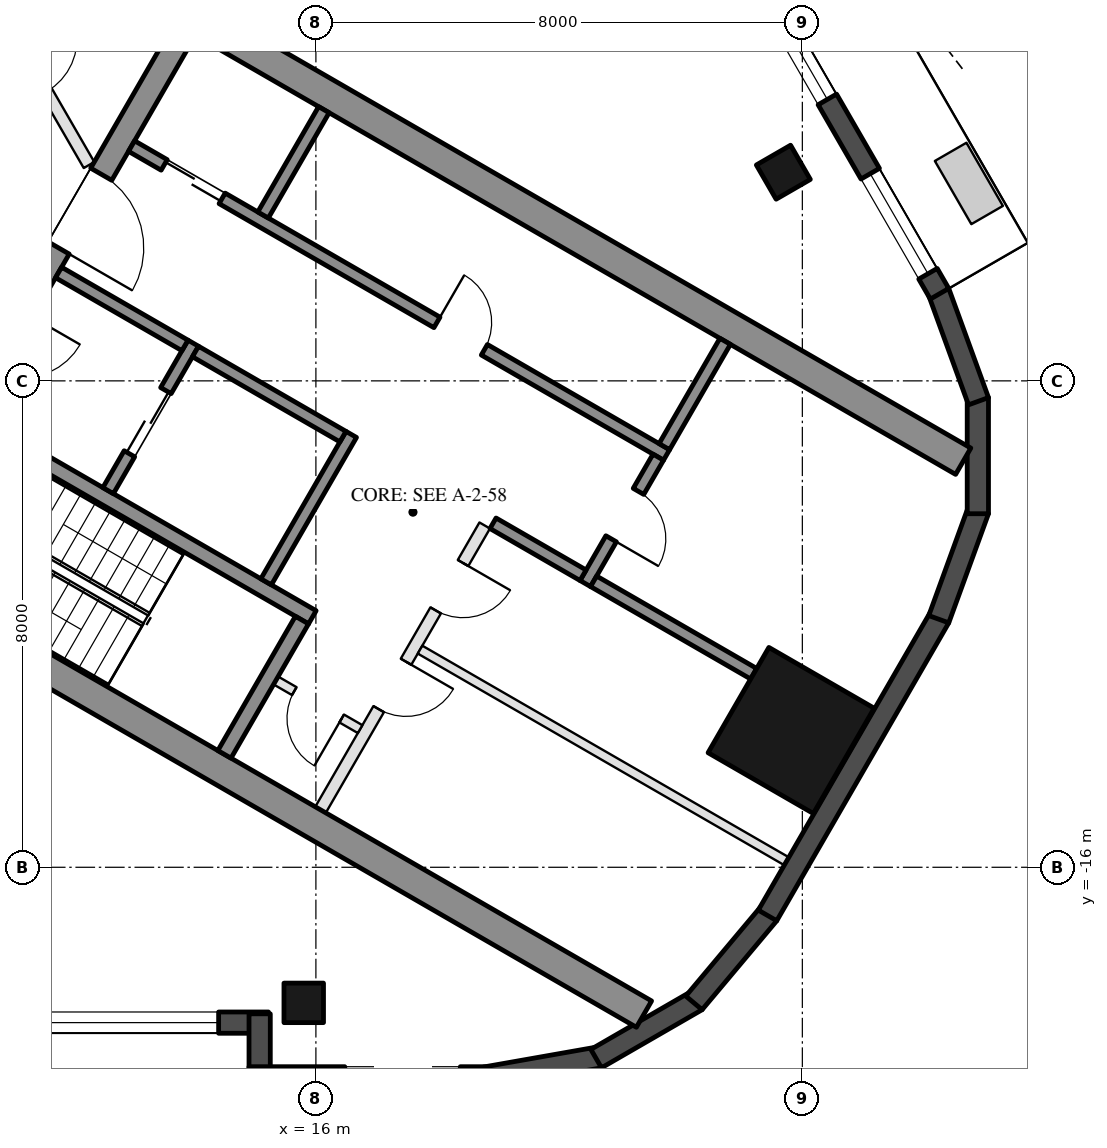
"""IFC4 building model, lengths in metres.
Left out: names, types, materials, properties, quantities, classifications, styles, units other than length and angle.
Written with IfcOpenShell. Run it as: python <this file> out.ifc"""

import sys

from ifc_helpers import new_model, si_unit, direction, frame, frame_2d, origin, origin_2d, place, context, subcontext, project, spatial, rectangle, hollow_rectangle, extrude, boolean, halfspace, element, fill, save


model = new_model("IFC4")
c1 = context("Model", 3, precision=1e-05, world=origin(), true_north=direction((0.0, 1.0)))
c2 = subcontext(c1, "Body", "Model", "MODEL_VIEW")
j1 = project(units=[si_unit("LENGTHUNIT", "METRE"), si_unit("PLANEANGLEUNIT", "RADIAN")], contexts=[c1])
p1 = place(None, origin())
s1 = spatial("IfcSite", under=j1, at=p1, CompositionType="ELEMENT")
p2 = place(p1, origin())
s2 = spatial("IfcBuilding", under=s1, at=p2, CompositionType="ELEMENT")
p3 = place(p2, frame((0.0, 0.0, 250.4)))
s3 = spatial("IfcBuildingStorey", under=s2, at=p3, CompositionType="ELEMENT", Elevation=250.4)
for number, where, z_axis, x_axis in (
    (1, (15.8, -18.23, 0.0), (0.0, 0.0, 1.0), (-1.0, 0.0, 0.0)),
    (2, (23.688, -4.568, 0.0), (0.0, 0.0, 1.0), (-0.5, 0.866, 0.0)),
):
    element("IfcColumn", number, at=place(p3, frame(where, z_axis=z_axis, x_axis=x_axis)), inside=s3, PredefinedType="COLUMN", context=c2, shape_type="SweptSolid", body=[
        boolean("DIFFERENCE", extrude(hollow_rectangle(XDim=0.65, YDim=0.65, WallThickness=0.03, at=origin_2d()), origin(), (0.0, 0.0, 1.0), 3.7), halfspace(frame((0.0, 0.0, 3.653), z_axis=(0.0, 0.0, 1.0), x_axis=(1.0, 0.0, 0.0)), False)),
    ])
p4 = place(p3, frame((23.816, -13.75, 0.0), z_axis=(0.0, 0.0, 1.0), x_axis=(0.5, 0.866025403784, 0.0)))
e3 = element("IfcColumn", 3, at=p4, inside=s3, PredefinedType="COLUMN", context=c2, shape_type="SweptSolid", body=[
    boolean("DIFFERENCE", extrude(hollow_rectangle(XDim=2.0, YDim=2.0, WallThickness=0.05, at=origin_2d()), origin(), (0.0, 0.0, 1.0), 3.7), halfspace(frame((0.0, 0.0, 3.588), z_axis=(0.0, 0.0, 1.0), x_axis=(1.0, 0.0, 0.0)), False)),
])
p5 = place(p3, frame((8.48, -18.555, 0.0), z_axis=(0.0, 0.0, 1.0), x_axis=(1.0, 0.0, 0.0)))
e4 = element("IfcWall", 4, at=p5, inside=s3, PredefinedType="SOLIDWALL", context=c2, shape_type="SweptSolid", body=[
    extrude(rectangle(XDim=6.74, YDim=0.35, at=frame_2d((3.37, 0.0))), origin(), (0.0, 0.0, 1.0), 3.55),
])
p6 = place(p5, frame((0.32, 0.0, 0.0)))
e5 = element("IfcOpeningElement", 5, at=p6, cuts=e4, PredefinedType="OPENING", context=c2, shape_type="SweptSolid", body=[
    extrude(rectangle(XDim=2.4, YDim=2.4, at=frame_2d((1.2, 1.2))), frame((0.0, 0.185, 0.0), z_axis=(0.0, -1.0, 0.0), x_axis=(1.0, 0.0, 0.0)), (0.0, 0.0, 1.0), 0.37),
])
p7 = place(p5, frame((3.02, 0.0, 0.3)))
e6 = element("IfcOpeningElement", 6, at=p7, cuts=e4, PredefinedType="OPENING", context=c2, shape_type="SweptSolid", body=[
    extrude(rectangle(XDim=2.9, YDim=2.65, at=frame_2d((1.45, 1.325))), frame((0.0, 0.185, 0.0), z_axis=(0.0, -1.0, 0.0), x_axis=(1.0, 0.0, 0.0)), (0.0, 0.0, 1.0), 0.37),
])
p8 = place(p3, frame((15.075, -18.41, 0.0), z_axis=(0.0, 0.0, 1.0), x_axis=(0.0, -1.0, 0.0)))
e7 = element("IfcWall", 7, at=p8, inside=s3, PredefinedType="SOLIDWALL", context=c2, shape_type="SweptSolid", body=[
    extrude(rectangle(XDim=1.22, YDim=0.35, at=frame_2d((0.61, 0.0))), origin(), (0.0, 0.0, 1.0), 3.55),
])
p9 = place(p3, frame((14.9, -19.455, 0.0), z_axis=(0.0, 0.0, 1.0), x_axis=(1.0, 0.0, 0.0)))
e8 = element("IfcWall", 8, at=p9, inside=s3, PredefinedType="SOLIDWALL", context=c2, shape_type="SweptSolid", body=[
    extrude(rectangle(XDim=3.916, YDim=0.35, at=frame_2d((1.958, 0.0))), origin(), (0.0, 0.0, 1.0), 3.55),
])
p10 = place(p9, frame((1.575, 0.0, 0.3)))
e9 = element("IfcOpeningElement", 9, at=p10, cuts=e8, PredefinedType="OPENING", context=c2, shape_type="SweptSolid", body=[
    extrude(rectangle(XDim=1.9, YDim=2.65, at=frame_2d((0.95, 1.325))), frame((0.0, 0.185, 0.0), z_axis=(0.0, -1.0, 0.0), x_axis=(1.0, 0.0, 0.0)), (0.0, 0.0, 1.0), 0.37),
])
p11 = place(p3, frame((18.785, -19.458, 0.0), z_axis=(0.0, 0.0, 1.0), x_axis=(0.984798995425, 0.173697837091, 0.0)))
e10 = element("IfcWall", 10, at=p11, inside=s3, PredefinedType="SOLIDWALL", context=c2, shape_type="SweptSolid", body=[
    extrude(rectangle(XDim=1.91, YDim=0.35, at=frame_2d((0.955, 0.0))), origin(), (0.0, 0.0, 1.0), 3.55),
])
for number, where, z_axis, x_axis in (
    (11, (20.61, -19.147, 0.0), (0.0, 0.0, 1.0), (0.866, 0.5, 0.0)),
    (12, (22.217, -18.231, 0.0), (0.0, 0.0, 1.0), (0.643, 0.766, 0.0)),
):
    element("IfcWall", number, at=place(p3, frame(where, z_axis=z_axis, x_axis=x_axis)), inside=s3, PredefinedType="SOLIDWALL", context=c2, shape_type="SweptSolid", body=[
        extrude(rectangle(XDim=1.91, YDim=0.35, at=frame_2d((0.955, 0.0))), origin(), (0.0, 0.0, 1.0), 3.55),
    ])
p12 = place(p3, frame((23.427, -16.792, 0.0), z_axis=(0.0, 0.0, 1.0), x_axis=(0.500018773155, 0.866014564827, 0.0)))
e13 = element("IfcWall", 13, at=p12, inside=s3, PredefinedType="SOLIDWALL", context=c2, shape_type="SweptSolid", body=[
    extrude(rectangle(XDim=5.658, YDim=0.35, at=frame_2d((2.829, 0.0))), origin(), (0.0, 0.0, 1.0), 3.55),
])
for number, where, z_axis, x_axis in (
    (14, (26.244, -11.92, 0.0), (0.0, 0.0, 1.0), (0.342, 0.94, 0.0)),
    (15, (26.886, -10.185, 0.0), (0.0, 0.0, 1.0), (0.0, 1.0, 0.0)),
    (16, (26.897, -8.335, 0.0), (0.0, 0.0, 1.0), (-0.342, 0.94, 0.0)),
):
    element("IfcWall", number, at=place(p3, frame(where, z_axis=z_axis, x_axis=x_axis)), inside=s3, PredefinedType="SOLIDWALL", context=c2, shape_type="SweptSolid", body=[
        extrude(rectangle(XDim=1.91, YDim=0.35, at=frame_2d((0.955, 0.0))), origin(), (0.0, 0.0, 1.0), 3.55),
    ])
p13 = place(p3, frame((26.257, -6.567, 0.0), z_axis=(0.0, 0.0, 1.0), x_axis=(-0.500023526245, 0.866011820475, 0.0)))
e17 = element("IfcWall", 17, at=p13, inside=s3, PredefinedType="SOLIDWALL", context=c2, shape_type="SweptSolid", body=[
    extrude(rectangle(XDim=11.816, YDim=0.35, at=frame_2d((5.908, 0.0))), origin(), (0.0, 0.0, 1.0), 3.55),
])
p14 = place(p13, frame((0.38, 0.0, 0.3)))
e18 = element("IfcOpeningElement", 18, at=p14, cuts=e17, PredefinedType="OPENING", context=c2, shape_type="SweptSolid", body=[
    extrude(rectangle(XDim=1.9, YDim=2.65, at=frame_2d((0.95, 1.325))), frame((0.0, 0.185, 0.0), z_axis=(0.0, -1.0, 0.0), x_axis=(1.0, 0.0, 0.0)), (0.0, 0.0, 1.0), 0.37),
])
p15 = place(p13, frame((7.841, 0.0, 0.0)))
e19 = element("IfcOpeningElement", 19, at=p15, cuts=e17, PredefinedType="OPENING", context=c2, shape_type="SweptSolid", body=[
    extrude(rectangle(XDim=2.4, YDim=2.4, at=frame_2d((1.2, 1.2))), frame((0.0, 0.185, 0.0), z_axis=(0.0, -1.0, 0.0), x_axis=(1.0, 0.0, 0.0)), (0.0, 0.0, 1.0), 0.37),
])
p16 = place(p13, frame((3.691, 0.0, 0.3)))
e20 = element("IfcOpeningElement", 20, at=p16, cuts=e17, PredefinedType="OPENING", context=c2, shape_type="SweptSolid", body=[
    extrude(rectangle(XDim=1.7, YDim=2.65, at=frame_2d((0.85, 1.325))), frame((0.0, 0.185, 0.0), z_axis=(0.0, -1.0, 0.0), x_axis=(1.0, 0.0, 0.0)), (0.0, 0.0, 1.0), 0.37),
])
p17 = place(p13, frame((5.691, 0.0, 0.3)))
e21 = element("IfcOpeningElement", 21, at=p17, cuts=e17, PredefinedType="OPENING", context=c2, shape_type="SweptSolid", body=[
    extrude(rectangle(XDim=1.7, YDim=2.65, at=frame_2d((0.85, 1.325))), frame((0.0, 0.185, 0.0), z_axis=(0.0, -1.0, 0.0), x_axis=(1.0, 0.0, 0.0)), (0.0, 0.0, 1.0), 0.37),
])
for number, where, z_axis, x_axis in (
    (22, (8.547, -10.997, 0.0), (0.0, 0.0, 1.0), (0.866, -0.5, 0.0)),
    (23, (13.797, -1.903, 0.0), (0.0, 0.0, 1.0), (0.866, -0.5, 0.0)),
):
    element("IfcWall", number, at=place(p3, frame(where, z_axis=z_axis, x_axis=x_axis)), inside=s3, PredefinedType="SHEAR", context=c2, shape_type="SweptSolid", body=[
        extrude(rectangle(XDim=14.837, YDim=0.5, at=frame_2d((7.418, 0.0))), origin(), (0.0, 0.0, 1.0), 3.5),
    ])
p18 = place(p3, frame((8.845, -10.88, 0.0), z_axis=(0.0, 0.0, 1.0), x_axis=(0.500004234368, 0.866022959057, 0.0)))
e24 = element("IfcWall", 24, at=p18, inside=s3, PredefinedType="SHEAR", context=c2, shape_type="SweptSolid", body=[
    extrude(rectangle(XDim=10.0, YDim=0.4, at=frame_2d((5.0, 0.0))), origin(), (0.0, 0.0, 1.0), 3.5),
])
p19 = place(p18, frame((3.55, 0.0, 0.0)))
e25 = element("IfcOpeningElement", 25, at=p19, cuts=e24, PredefinedType="OPENING", context=c2, shape_type="SweptSolid", body=[
    extrude(rectangle(XDim=1.1, YDim=2.1, at=frame_2d((0.55, 1.05))), frame((0.0, 0.21, 0.0), z_axis=(0.0, -1.0, 0.0), x_axis=(1.0, 0.0, 0.0)), (0.0, 0.0, 1.0), 0.42),
])
p20 = place(p18, frame((5.85, 0.0, 0.0)))
e26 = element("IfcOpeningElement", 26, at=p20, cuts=e24, PredefinedType="OPENING", context=c2, shape_type="SweptSolid", body=[
    extrude(rectangle(XDim=1.4, YDim=2.1, at=frame_2d((0.7, 1.05))), frame((0.0, 0.21, 0.0), z_axis=(0.0, -1.0, 0.0), x_axis=(1.0, 0.0, 0.0)), (0.0, 0.0, 1.0), 0.42),
])
p21 = place(p3, frame((10.356, -8.664, 0.0), z_axis=(0.0, 0.0, 1.0), x_axis=(0.866028629588, -0.499994412703, 0.0)))
e27 = element("IfcWall", 27, at=p21, inside=s3, PredefinedType="SHEAR", context=c2, shape_type="SweptSolid", body=[
    extrude(rectangle(XDim=6.45, YDim=0.25, at=frame_2d((3.225, 0.0))), origin(), (0.0, 0.0, 1.0), 3.5),
])
p22 = place(p21, frame((0.3, 0.0, 0.0)))
e28 = element("IfcOpeningElement", 28, at=p22, cuts=e27, PredefinedType="OPENING", context=c2, shape_type="SweptSolid", body=[
    extrude(rectangle(XDim=1.0, YDim=2.1, at=frame_2d((0.5, 1.05))), frame((0.0, 0.135, 0.0), z_axis=(0.0, -1.0, 0.0), x_axis=(1.0, 0.0, 0.0)), (0.0, 0.0, 1.0), 0.27),
])
p23 = place(p3, frame((14.496, -14.143, 0.0), z_axis=(0.0, 0.0, 1.0), x_axis=(0.500062241894, 0.865989465428, 0.0)))
e29 = element("IfcWall", 29, at=p23, inside=s3, PredefinedType="SHEAR", context=c2, shape_type="SweptSolid", body=[
    extrude(rectangle(XDim=2.55, YDim=0.25, at=frame_2d((1.275, 0.0))), origin(), (0.0, 0.0, 1.0), 3.5),
])
p24 = place(p3, frame((15.181, -11.305, 0.0), z_axis=(0.0, 0.0, 1.0), x_axis=(0.49994636267, 0.866056369097, 0.0)))
e30 = element("IfcWall", 30, at=p24, inside=s3, PredefinedType="SHEAR", context=c2, shape_type="SweptSolid", body=[
    extrude(rectangle(XDim=2.8, YDim=0.2, at=frame_2d((1.4, 0.0))), origin(), (0.0, 0.0, 1.0), 3.5),
])
p25 = place(p3, frame((12.583, -9.805, 0.0), z_axis=(0.0, 0.0, 1.0), x_axis=(0.49994636267, 0.866056369097, 0.0)))
e31 = element("IfcWall", 31, at=p25, inside=s3, PredefinedType="SHEAR", context=c2, shape_type="SweptSolid", body=[
    extrude(rectangle(XDim=2.8, YDim=0.2, at=frame_2d((1.4, 0.0))), origin(), (0.0, 0.0, 1.0), 3.5),
])
p26 = place(p25, frame((0.7, 0.0, 0.0)))
e32 = element("IfcOpeningElement", 32, at=p26, cuts=e31, PredefinedType="OPENING", context=c2, shape_type="SweptSolid", body=[
    extrude(rectangle(XDim=1.2, YDim=2.1, at=frame_2d((0.6, 1.05))), frame((0.0, 0.11, 0.0), z_axis=(0.0, -1.0, 0.0), x_axis=(1.0, 0.0, 0.0)), (0.0, 0.0, 1.0), 0.22),
])
p27 = place(p3, frame((11.768, -6.217, 0.0), z_axis=(0.0, 0.0, 1.0), x_axis=(0.866050077142, -0.499957262057, 0.0)))
e33 = element("IfcWall", 33, at=p27, inside=s3, PredefinedType="SHEAR", context=c2, shape_type="SweptSolid", body=[
    extrude(rectangle(XDim=2.4, YDim=0.2, at=frame_2d((1.2, 0.0))), origin(), (0.0, 0.0, 1.0), 3.5),
])
p28 = place(p3, frame((14.02, -7.517, 0.0), z_axis=(0.0, 0.0, 1.0), x_axis=(0.866034573852, -0.49998411664, 0.0)))
e34 = element("IfcWall", 34, at=p28, inside=s3, PredefinedType="SHEAR", context=c2, shape_type="SweptSolid", body=[
    extrude(rectangle(XDim=2.8, YDim=0.2, at=frame_2d((1.4, 0.0))), origin(), (0.0, 0.0, 1.0), 3.5),
])
p29 = place(p3, frame((12.968, -4.138, 0.0), z_axis=(0.0, 0.0, 1.0), x_axis=(0.866028328073, -0.49999493495, 0.0)))
e35 = element("IfcWall", 35, at=p29, inside=s3, PredefinedType="SHEAR", context=c2, shape_type="SweptSolid", body=[
    extrude(rectangle(XDim=10.16, YDim=0.2, at=frame_2d((5.08, 0.0))), origin(), (0.0, 0.0, 1.0), 3.5),
])
p30 = place(p29, frame((0.62, 0.0, 0.0)))
e36 = element("IfcOpeningElement", 36, at=p30, cuts=e35, PredefinedType="OPENING", context=c2, shape_type="SweptSolid", body=[
    extrude(rectangle(XDim=1.1, YDim=2.1, at=frame_2d((0.55, 1.05))), frame((0.0, 0.11, 0.0), z_axis=(0.0, -1.0, 0.0), x_axis=(1.0, 0.0, 0.0)), (0.0, 0.0, 1.0), 0.22),
])
p31 = place(p29, frame((5.8, 0.0, 0.0)))
e37 = element("IfcOpeningElement", 37, at=p31, cuts=e35, PredefinedType="OPENING", context=c2, shape_type="SweptSolid", body=[
    extrude(rectangle(XDim=0.9, YDim=2.1, at=frame_2d((0.45, 1.05))), frame((0.0, 0.11, 0.0), z_axis=(0.0, -1.0, 0.0), x_axis=(1.0, 0.0, 0.0)), (0.0, 0.0, 1.0), 0.22),
])
p32 = place(p3, frame((20.43, -11.333, 0.0), z_axis=(0.0, 0.0, 1.0), x_axis=(0.500001309137, 0.866024647952, 0.0)))
e38 = element("IfcWall", 38, at=p32, inside=s3, PredefinedType="SHEAR", context=c2, shape_type="SweptSolid", body=[
    extrude(rectangle(XDim=2.4, YDim=0.2, at=frame_2d((1.2, 0.0))), origin(), (0.0, 0.0, 1.0), 3.5),
])
p33 = place(p32, frame((0.85, 0.0, 0.0)))
e39 = element("IfcOpeningElement", 39, at=p33, cuts=e38, PredefinedType="OPENING", context=c2, shape_type="SweptSolid", body=[
    extrude(rectangle(XDim=0.9, YDim=2.1, at=frame_2d((0.45, 1.05))), frame((0.0, 0.11, 0.0), z_axis=(0.0, -1.0, 0.0), x_axis=(1.0, 0.0, 0.0)), (0.0, 0.0, 1.0), 0.22),
])
p34 = place(p3, frame((18.913, -10.342, 0.0), z_axis=(0.0, 0.0, 1.0), x_axis=(0.866038183914, -0.499977863513, 0.0)))
e40 = element("IfcWall", 40, at=p34, inside=s3, PredefinedType="SHEAR", context=c2, shape_type="SweptSolid", body=[
    extrude(rectangle(XDim=1.71, YDim=0.2, at=frame_2d((0.855, 0.0))), origin(), (0.0, 0.0, 1.0), 3.5),
])
for number, where, z_axis, x_axis in (
    (41, (15.131, -5.272, 0.0), (0.0, 0.0, 1.0), (0.5, 0.866, 0.0)),
    (42, (21.73, -9.082, 0.0), (0.0, 0.0, 1.0), (0.5, 0.866, 0.0)),
):
    element("IfcWall", number, at=place(p3, frame(where, z_axis=z_axis, x_axis=x_axis)), inside=s3, PredefinedType="SHEAR", context=c2, shape_type="SweptSolid", body=[
        extrude(rectangle(XDim=2.0, YDim=0.2, at=frame_2d((1.0, 0.0))), origin(), (0.0, 0.0, 1.0), 3.5),
    ])
p35 = place(p3, frame((20.567, -11.297, 0.0), z_axis=(0.0, 0.0, 1.0), x_axis=(0.866065229334, -0.49993101378, 0.0)))
e43 = element("IfcWall", 43, at=p35, inside=s3, PredefinedType="SHEAR", context=c2, shape_type="SweptSolid", body=[
    extrude(rectangle(XDim=3.04, YDim=0.2, at=frame_2d((1.52, 0.0))), origin(), (0.0, 0.0, 1.0), 3.5),
])
p36 = place(p3, frame((16.076, -15.055, 0.0), z_axis=(0.0, 0.0, 1.0), x_axis=(0.499995103361, 0.866028230842, 0.0)))
e44 = element("IfcWall", 44, at=p36, inside=s3, PredefinedType="PARTITIONING", context=c2, shape_type="SweptSolid", body=[
    extrude(rectangle(XDim=5.4, YDim=0.2, at=frame_2d((2.7, 0.0))), origin(), (0.0, 0.0, 1.0), 3.5),
])
p37 = place(p36, frame((1.913, 0.0, 0.0)))
e45 = element("IfcOpeningElement", 45, at=p37, cuts=e44, PredefinedType="OPENING", context=c2, shape_type="SweptSolid", body=[
    extrude(rectangle(XDim=0.9, YDim=2.1, at=frame_2d((0.45, 1.05))), frame((0.0, 0.11, 0.0), z_axis=(0.0, -1.0, 0.0), x_axis=(1.0, 0.0, 0.0)), (0.0, 0.0, 1.0), 0.22),
])
p38 = place(p36, frame((3.788, 0.0, 0.0)))
e46 = element("IfcOpeningElement", 46, at=p38, cuts=e44, PredefinedType="OPENING", context=c2, shape_type="SweptSolid", body=[
    extrude(rectangle(XDim=0.9, YDim=2.1, at=frame_2d((0.45, 1.05))), frame((0.0, 0.11, 0.0), z_axis=(0.0, -1.0, 0.0), x_axis=(1.0, 0.0, 0.0)), (0.0, 0.0, 1.0), 0.22),
])
p39 = place(p3, frame((15.342, -12.928, 0.0), z_axis=(0.0, 0.0, 1.0), x_axis=(0.865989903783, -0.500061482766, 0.0)))
e47 = element("IfcWall", 47, at=p39, inside=s3, PredefinedType="PARTITIONING", context=c2, shape_type="SweptSolid", body=[
    extrude(rectangle(XDim=1.6, YDim=0.15, at=frame_2d((0.8, 0.0))), origin(), (0.0, 0.0, 1.0), 3.5),
])
p40 = place(p39, frame((0.35, 0.0, 0.0)))
e48 = element("IfcOpeningElement", 48, at=p40, cuts=e47, PredefinedType="OPENING", context=c2, shape_type="SweptSolid", body=[
    extrude(rectangle(XDim=0.9, YDim=2.1, at=frame_2d((0.45, 1.05))), frame((0.0, 0.085, 0.0), z_axis=(0.0, -1.0, 0.0), x_axis=(1.0, 0.0, 0.0)), (0.0, 0.0, 1.0), 0.17),
])
p41 = place(p3, frame((17.713, -12.42, 0.0), z_axis=(0.0, 0.0, 1.0), x_axis=(0.866016523273, -0.500015381182, 0.0)))
e49 = element("IfcWall", 49, at=p41, inside=s3, PredefinedType="PARTITIONING", context=c2, shape_type="SweptSolid", body=[
    extrude(rectangle(XDim=6.95, YDim=0.15, at=frame_2d((3.475, 0.0))), origin(), (0.0, 0.0, 1.0), 3.5),
])
p42 = place(p3, frame((10.375, -1.169, 0.0), z_axis=(0.0, 0.0, 1.0), x_axis=(0.500055316652, -0.865993464345, 0.0)))
e50 = element("IfcWall", 50, at=p42, inside=s3, PredefinedType="PARTITIONING", context=c2, shape_type="SweptSolid", body=[
    extrude(rectangle(XDim=3.788, YDim=0.2, at=frame_2d((1.894, 0.0))), origin(), (0.0, 0.0, 1.0), 2.95),
])
p43 = place(p42, frame((1.394, 0.0, 0.0)))
e51 = element("IfcOpeningElement", 51, at=p43, cuts=e50, PredefinedType="OPENING", context=c2, shape_type="SweptSolid", body=[
    extrude(rectangle(XDim=1.0, YDim=2.1, at=frame_2d((0.5, 1.05))), frame((0.0, 0.11, 0.0), z_axis=(0.0, -1.0, 0.0), x_axis=(1.0, 0.0, 0.0)), (0.0, 0.0, 1.0), 0.22),
])
p44 = place(p7, origin())
e52 = element("IfcWindow", 52, at=p44, inside=s3, PartitioningType="SINGLE_PANEL", PredefinedType="WINDOW", context=c2, shape_type="SweptSolid", body=[
    extrude(rectangle(XDim=2.9, YDim=2.65, at=frame_2d((1.45, 1.325))), frame((0.0, 0.03, 0.0), z_axis=(0.0, -1.0, 0.0), x_axis=(1.0, 0.0, 0.0)), (0.0, 0.0, 1.0), 0.06),
])
fill(e6, e52)
p45 = place(p14, origin())
e53 = element("IfcWindow", 53, at=p45, inside=s3, PartitioningType="SINGLE_PANEL", PredefinedType="WINDOW", context=c2, shape_type="SweptSolid", body=[
    extrude(rectangle(XDim=1.9, YDim=2.65, at=frame_2d((0.95, 1.325))), frame((0.0, 0.03, 0.0), z_axis=(0.0, -1.0, 0.0), x_axis=(1.0, 0.0, 0.0)), (0.0, 0.0, 1.0), 0.06),
])
fill(e18, e53)
p46 = place(p16, origin())
e54 = element("IfcWindow", 54, at=p46, inside=s3, PartitioningType="SINGLE_PANEL", PredefinedType="WINDOW", context=c2, shape_type="SweptSolid", body=[
    extrude(rectangle(XDim=1.7, YDim=2.65, at=frame_2d((0.85, 1.325))), frame((0.0, 0.03, 0.0), z_axis=(0.0, -1.0, 0.0), x_axis=(1.0, 0.0, 0.0)), (0.0, 0.0, 1.0), 0.06),
])
fill(e20, e54)
p47 = place(p26, origin())
e55 = element("IfcDoor", 55, at=p47, inside=s3, OperationType="DOUBLE_DOOR_SLIDING", PredefinedType="DOOR", context=c2, shape_type="SweptSolid", body=[
    extrude(rectangle(XDim=1.2, YDim=2.1, at=frame_2d((0.6, 1.05))), frame((0.0, 0.025, 0.0), z_axis=(0.0, -1.0, 0.0), x_axis=(1.0, 0.0, 0.0)), (0.0, 0.0, 1.0), 0.05),
])
fill(e32, e55)
p48 = place(p40, frame((0.9, 0.0, 0.0), z_axis=(0.0, 0.0, 1.0), x_axis=(-1.0, 0.0, 0.0)))
e56 = element("IfcDoor", 56, at=p48, inside=s3, OperationType="SINGLE_SWING_LEFT", PredefinedType="DOOR", context=c2, shape_type="SweptSolid", body=[
    extrude(rectangle(XDim=0.9, YDim=2.1, at=frame_2d((0.45, 1.05))), frame((0.0, 0.025, 0.0), z_axis=(0.0, -1.0, 0.0), x_axis=(1.0, 0.0, 0.0)), (0.0, 0.0, 1.0), 0.05),
])
fill(e48, e56)
p49 = place(p30, origin())
e57 = element("IfcDoor", 57, at=p49, inside=s3, OperationType="DOUBLE_DOOR_SLIDING", PredefinedType="DOOR", context=c2, shape_type="SweptSolid", body=[
    extrude(rectangle(XDim=1.1, YDim=2.1, at=frame_2d((0.55, 1.05))), frame((0.0, 0.025, 0.0), z_axis=(0.0, -1.0, 0.0), x_axis=(1.0, 0.0, 0.0)), (0.0, 0.0, 1.0), 0.05),
])
fill(e36, e57)
p50 = place(p31, origin())
e58 = element("IfcDoor", 58, at=p50, inside=s3, OperationType="SINGLE_SWING_LEFT", PredefinedType="DOOR", context=c2, shape_type="SweptSolid", body=[
    extrude(rectangle(XDim=0.9, YDim=2.1, at=frame_2d((0.45, 1.05))), frame((0.0, 0.025, 0.0), z_axis=(0.0, -1.0, 0.0), x_axis=(1.0, 0.0, 0.0)), (0.0, 0.0, 1.0), 0.05),
])
fill(e37, e58)
p51 = place(p33, frame((0.9, 0.0, 0.0), z_axis=(0.0, 0.0, 1.0), x_axis=(-1.0, 0.0, 0.0)))
e59 = element("IfcDoor", 59, at=p51, inside=s3, OperationType="SINGLE_SWING_RIGHT", PredefinedType="DOOR", context=c2, shape_type="SweptSolid", body=[
    extrude(rectangle(XDim=0.9, YDim=2.1, at=frame_2d((0.45, 1.05))), frame((0.0, 0.025, 0.0), z_axis=(0.0, -1.0, 0.0), x_axis=(1.0, 0.0, 0.0)), (0.0, 0.0, 1.0), 0.05),
])
fill(e39, e59)
p52 = place(p37, frame((0.9, 0.0, 0.0), z_axis=(0.0, 0.0, 1.0), x_axis=(-1.0, 0.0, 0.0)))
e60 = element("IfcDoor", 60, at=p52, inside=s3, OperationType="SINGLE_SWING_LEFT", PredefinedType="DOOR", context=c2, shape_type="SweptSolid", body=[
    extrude(rectangle(XDim=0.9, YDim=2.1, at=frame_2d((0.45, 1.05))), frame((0.0, 0.025, 0.0), z_axis=(0.0, -1.0, 0.0), x_axis=(1.0, 0.0, 0.0)), (0.0, 0.0, 1.0), 0.05),
])
fill(e45, e60)
p53 = place(p38, frame((0.9, 0.0, 0.0), z_axis=(0.0, 0.0, 1.0), x_axis=(-1.0, 0.0, 0.0)))
e61 = element("IfcDoor", 61, at=p53, inside=s3, OperationType="SINGLE_SWING_LEFT", PredefinedType="DOOR", context=c2, shape_type="SweptSolid", body=[
    extrude(rectangle(XDim=0.9, YDim=2.1, at=frame_2d((0.45, 1.05))), frame((0.0, 0.025, 0.0), z_axis=(0.0, -1.0, 0.0), x_axis=(1.0, 0.0, 0.0)), (0.0, 0.0, 1.0), 0.05),
])
fill(e46, e61)
p54 = place(p20, frame((1.4, 0.0, 0.0), z_axis=(0.0, 0.0, 1.0), x_axis=(-1.0, 0.0, 0.0)))
e62 = element("IfcDoor", 62, at=p54, inside=s3, OperationType="DOUBLE_DOOR_SINGLE_SWING", PredefinedType="DOOR", context=c2, shape_type="SweptSolid", body=[
    extrude(rectangle(XDim=1.4, YDim=2.1, at=frame_2d((0.7, 1.05))), frame((0.0, 0.025, 0.0), z_axis=(0.0, -1.0, 0.0), x_axis=(1.0, 0.0, 0.0)), (0.0, 0.0, 1.0), 0.05),
])
fill(e26, e62)
save(model, sys.argv[1])
